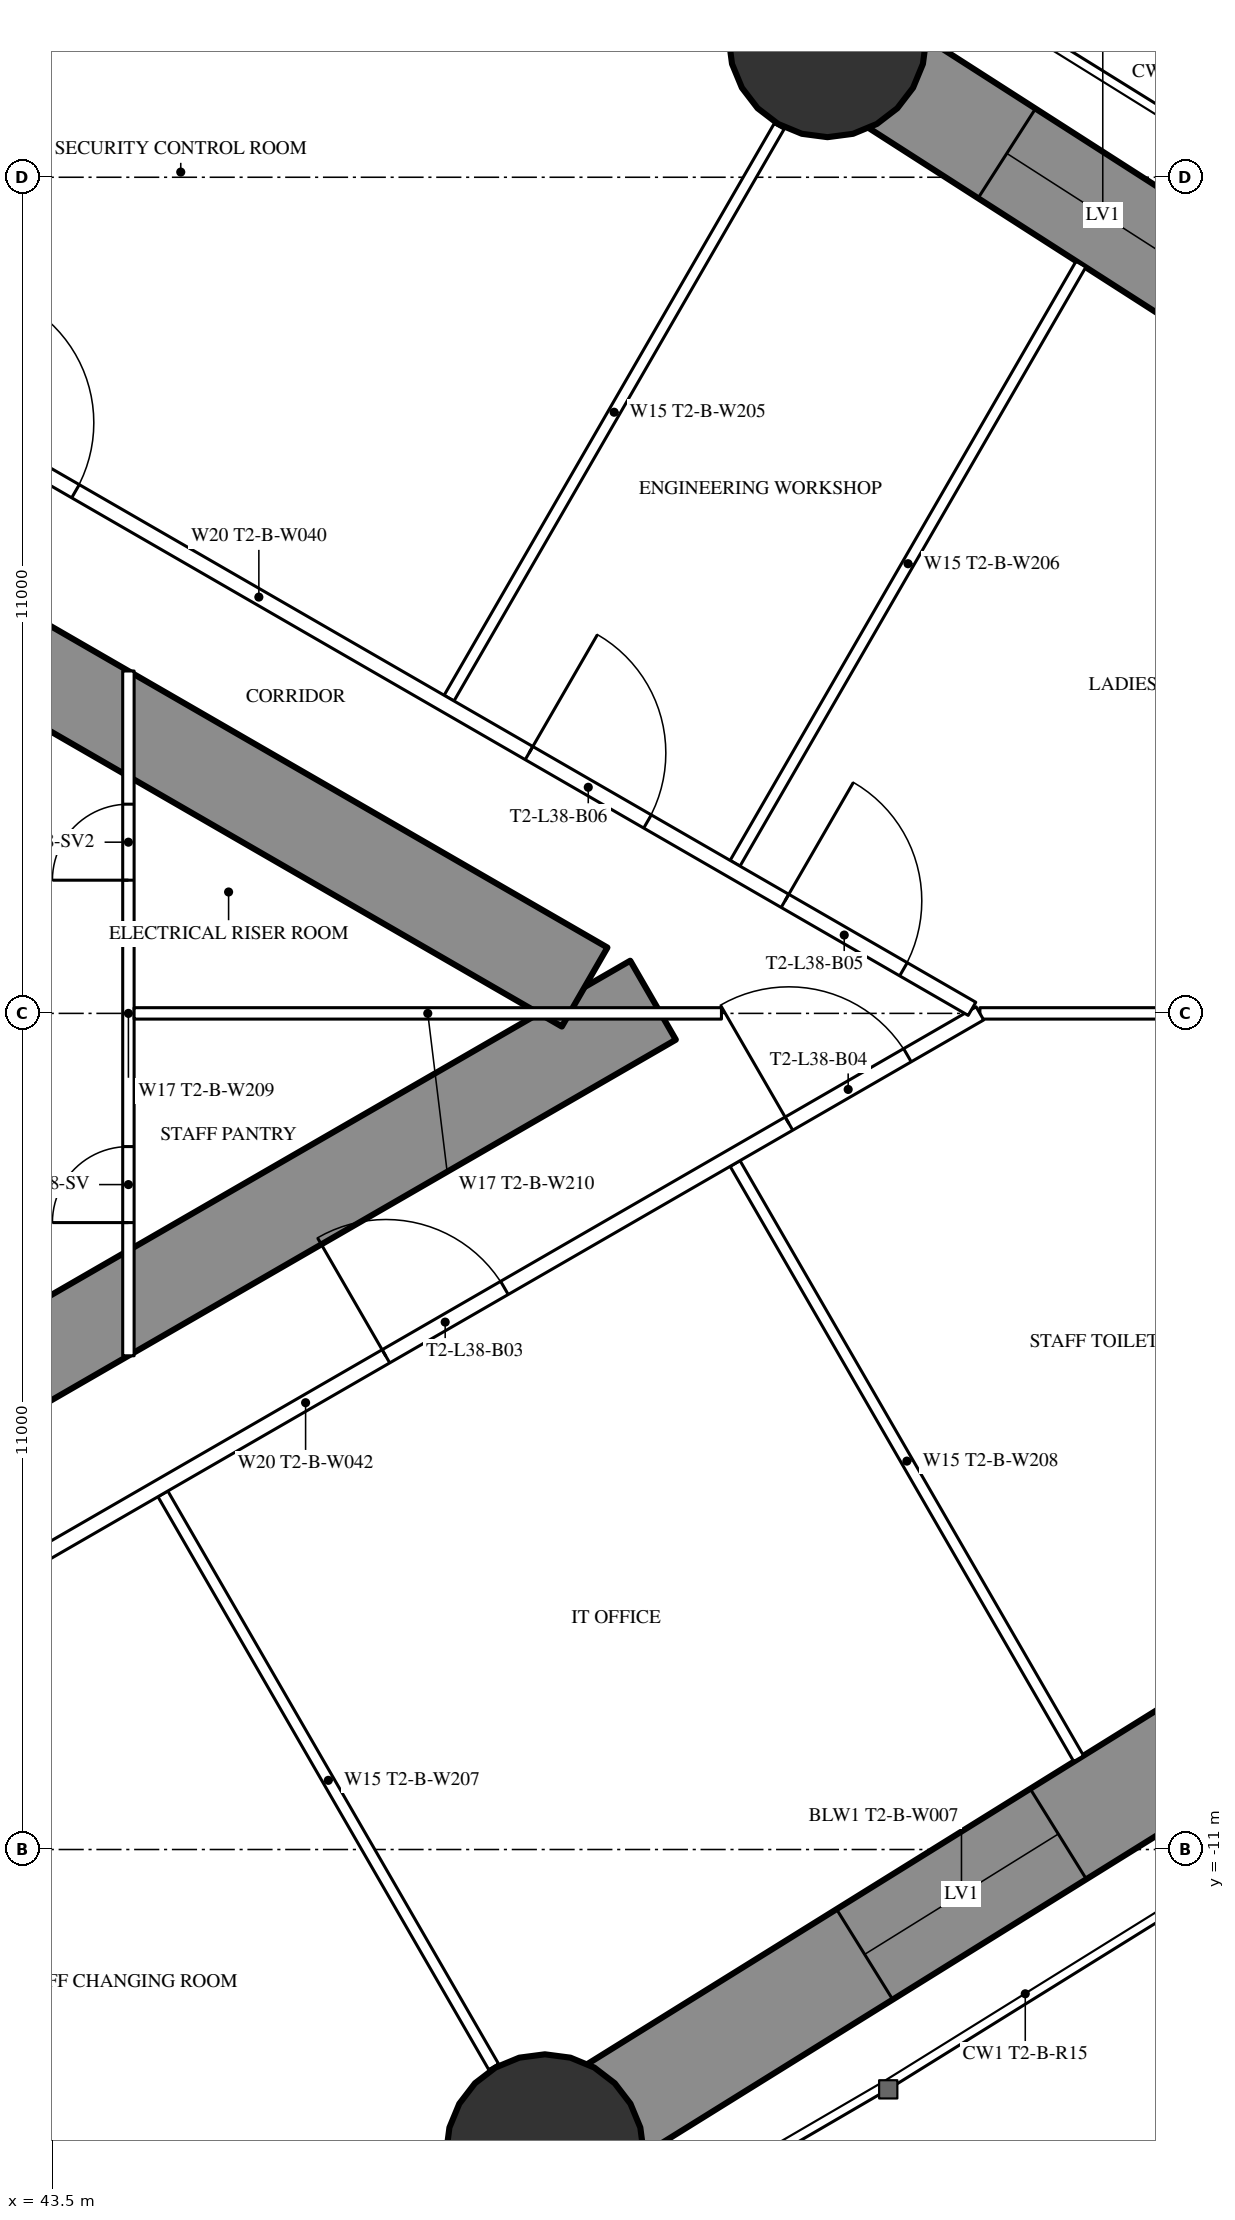
"""IFC4 building model, lengths in metres.
Left out: names, types, materials, properties, quantities, classifications, styles, units other than length and angle.
Written with IfcOpenShell. Run it as: python <this file> out.ifc"""

import sys

from ifc_helpers import new_model, si_unit, direction, frame, frame_2d, origin, origin_2d, place, context, subcontext, project, spatial, rectangle, hollow_circle, extrude, element, fill, save


model = new_model("IFC4")
c1 = context("Model", 3, precision=1e-05, world=origin(), true_north=direction((0.0, 1.0)))
c2 = subcontext(c1, "Body", "Model", "MODEL_VIEW")
j1 = project(units=[si_unit("LENGTHUNIT", "METRE"), si_unit("PLANEANGLEUNIT", "RADIAN")], contexts=[c1])
p1 = place(None, origin())
s1 = spatial("IfcSite", under=j1, at=p1, CompositionType="ELEMENT")
p2 = place(p1, origin())
s2 = spatial("IfcBuilding", under=s1, at=p2, CompositionType="ELEMENT")
p3 = place(p2, frame((0.0, 0.0, 143.1)))
s3 = spatial("IfcBuildingStorey", under=s2, at=p3, CompositionType="ELEMENT", Elevation=143.1)
for number, where, z_axis, x_axis in (
    (1, (53.697, 12.827, 0.0), (0.0, 0.0, 1.0), (1.0, 0.0, 0.0)),
    (2, (49.979, -14.994, 0.0), (0.0, 0.0, 1.0), (1.0, 0.0, 0.0)),
):
    element("IfcColumn", number, at=place(p3, frame(where, z_axis=z_axis, x_axis=x_axis)), inside=s3, PredefinedType="COLUMN", context=c2, shape_type="SweptSolid", body=[
        extrude(hollow_circle(Radius=1.3, WallThickness=0.1, at=origin_2d()), origin(), (0.0, 0.0, 1.0), 3.6),
    ])
p4 = place(p3, frame((27.2, -13.8, 0.0), z_axis=(0.0, 0.0, 1.0), x_axis=(0.866027159892, 0.499996958321, 0.0)))
e3 = element("IfcWall", 3, at=p4, inside=s3, PredefinedType="SHEAR", context=c2, shape_type="SweptSolid", body=[
    extrude(rectangle(XDim=27.947, YDim=1.2, at=frame_2d((13.973, 0.0))), origin(), (0.0, 0.0, 1.0), 3.6),
])
p5 = place(p4, frame((4.6, 0.0, 0.0)))
e4 = element("IfcOpeningElement", 4, at=p5, cuts=e3, PredefinedType="OPENING", context=c2, shape_type="SweptSolid", body=[
    extrude(rectangle(XDim=1.0, YDim=2.2, at=frame_2d((0.5, 1.1))), frame((0.0, 0.61, 0.0), z_axis=(0.0, -1.0, 0.0), x_axis=(1.0, 0.0, 0.0)), (0.0, 0.0, 1.0), 1.22),
])
p6 = place(p4, frame((14.045, 0.0, 0.0)))
e5 = element("IfcOpeningElement", 5, at=p6, cuts=e3, PredefinedType="OPENING", context=c2, shape_type="SweptSolid", body=[
    extrude(rectangle(XDim=1.8, YDim=2.2, at=frame_2d((0.9, 1.1))), frame((0.0, 0.61, 0.0), z_axis=(0.0, -1.0, 0.0), x_axis=(1.0, 0.0, 0.0)), (0.0, 0.0, 1.0), 1.22),
])
p7 = place(p3, frame((27.2, 13.8, 0.0), z_axis=(0.0, 0.0, 1.0), x_axis=(0.866024515034, -0.500001539357, 0.0)))
e6 = element("IfcWall", 6, at=p7, inside=s3, PredefinedType="SHEAR", context=c2, shape_type="SweptSolid", body=[
    extrude(rectangle(XDim=26.907, YDim=1.2, at=frame_2d((13.454, 0.0))), origin(), (0.0, 0.0, 1.0), 3.6),
])
p8 = place(p7, frame((4.5, 0.0, 0.0)))
e7 = element("IfcOpeningElement", 7, at=p8, cuts=e6, PredefinedType="OPENING", context=c2, shape_type="SweptSolid", body=[
    extrude(rectangle(XDim=1.0, YDim=2.2, at=frame_2d((0.5, 1.1))), frame((0.0, 0.61, 0.0), z_axis=(0.0, -1.0, 0.0), x_axis=(1.0, 0.0, 0.0)), (0.0, 0.0, 1.0), 1.22),
])
p9 = place(p7, frame((12.545, 0.0, 0.0)))
e8 = element("IfcOpeningElement", 8, at=p9, cuts=e6, PredefinedType="OPENING", context=c2, shape_type="SweptSolid", body=[
    extrude(rectangle(XDim=1.8, YDim=2.2, at=frame_2d((0.9, 1.1))), frame((0.0, 0.61, 0.0), z_axis=(0.0, -1.0, 0.0), x_axis=(1.0, 0.0, 0.0)), (0.0, 0.0, 1.0), 1.22),
])
p10 = place(p3, frame((42.366, -19.007, 0.0), z_axis=(0.0, 0.0, 1.0), x_axis=(0.884632510133, 0.466288882578, 0.0)))
e9 = element("IfcWall", 9, at=p10, inside=s3, PredefinedType="SHEAR", context=c2, shape_type="SweptSolid", body=[
    extrude(rectangle(XDim=8.606, YDim=1.4, at=frame_2d((4.303, 0.0))), origin(), (0.0, 0.0, 1.0), 3.6),
])
p11 = place(p10, frame((2.803, 0.0, 0.6)))
e10 = element("IfcOpeningElement", 10, at=p11, cuts=e9, PredefinedType="OPENING", context=c2, shape_type="SweptSolid", body=[
    extrude(rectangle(XDim=3.0, YDim=1.2, at=frame_2d((1.5, 0.6))), frame((0.0, 0.71, 0.0), z_axis=(0.0, -1.0, 0.0), x_axis=(1.0, 0.0, 0.0)), (0.0, 0.0, 1.0), 1.42),
])
p12 = place(p3, frame((49.979, -14.994, 0.0), z_axis=(0.0, 0.0, 1.0), x_axis=(0.849312372751, 0.527890607505, 0.0)))
e11 = element("IfcWall", 11, at=p12, inside=s3, PredefinedType="SHEAR", context=c2, shape_type="SweptSolid", body=[
    extrude(rectangle(XDim=12.906, YDim=1.4, at=frame_2d((6.453, 0.0))), origin(), (0.0, 0.0, 1.0), 3.6),
])
p13 = place(p12, frame((4.953, 0.0, 0.6)))
e12 = element("IfcOpeningElement", 12, at=p13, cuts=e11, PredefinedType="OPENING", context=c2, shape_type="SweptSolid", body=[
    extrude(rectangle(XDim=3.0, YDim=1.2, at=frame_2d((1.5, 0.6))), frame((0.0, 0.71, 0.0), z_axis=(0.0, -1.0, 0.0), x_axis=(1.0, 0.0, 0.0)), (0.0, 0.0, 1.0), 1.42),
])
p14 = place(p3, frame((60.941, 8.181, 0.0), z_axis=(0.0, 0.0, 1.0), x_axis=(-0.841727408736, 0.539902740669, 0.0)))
e13 = element("IfcWall", 13, at=p14, inside=s3, PredefinedType="SHEAR", context=c2, shape_type="SweptSolid", body=[
    extrude(rectangle(XDim=8.606, YDim=1.4, at=frame_2d((4.303, 0.0))), origin(), (0.0, 0.0, 1.0), 3.6),
])
p15 = place(p14, frame((2.803, 0.0, 0.6)))
e14 = element("IfcOpeningElement", 14, at=p15, cuts=e13, PredefinedType="OPENING", context=c2, shape_type="SweptSolid", body=[
    extrude(rectangle(XDim=3.0, YDim=1.2, at=frame_2d((1.5, 0.6))), frame((0.0, 0.71, 0.0), z_axis=(0.0, -1.0, 0.0), x_axis=(1.0, 0.0, 0.0)), (0.0, 0.0, 1.0), 1.42),
])
p16 = place(p3, frame((53.697, 12.827, 0.0), z_axis=(0.0, 0.0, 1.0), x_axis=(-0.87792015078, 0.478807068509, 0.0)))
e15 = element("IfcWall", 15, at=p16, inside=s3, PredefinedType="SHEAR", context=c2, shape_type="SweptSolid", body=[
    extrude(rectangle(XDim=12.906, YDim=1.4, at=frame_2d((6.453, 0.0))), origin(), (0.0, 0.0, 1.0), 3.6),
])
p17 = place(p16, frame((4.953, 0.0, 0.6)))
e16 = element("IfcOpeningElement", 16, at=p17, cuts=e15, PredefinedType="OPENING", context=c2, shape_type="SweptSolid", body=[
    extrude(rectangle(XDim=3.0, YDim=1.2, at=frame_2d((1.5, 0.6))), frame((0.0, 0.71, 0.0), z_axis=(0.0, -1.0, 0.0), x_axis=(1.0, 0.0, 0.0)), (0.0, 0.0, 1.0), 1.42),
])
p18 = place(p3, frame((44.954, -6.321, 0.0), z_axis=(0.0, 0.0, 1.0), x_axis=(0.500018676722, -0.866014620505, 0.0)))
e17 = element("IfcWall", 17, at=p18, inside=s3, PredefinedType="PARTITIONING", context=c2, shape_type="SweptSolid", body=[
    extrude(rectangle(XDim=8.704, YDim=0.15, at=frame_2d((4.352, 0.0))), origin(), (0.0, 0.0, 1.0), 2.15),
])
p19 = place(p3, frame((52.481, -1.975, 0.0), z_axis=(0.0, 0.0, 1.0), x_axis=(0.499984247144, -0.866034498509, 0.0)))
e18 = element("IfcWall", 18, at=p19, inside=s3, PredefinedType="PARTITIONING", context=c2, shape_type="SweptSolid", body=[
    extrude(rectangle(XDim=9.041, YDim=0.15, at=frame_2d((4.521, 0.0))), origin(), (0.0, 0.0, 1.0), 3.35),
])
p20 = place(p3, frame((48.719, 4.147, 0.0), z_axis=(0.0, 0.0, 1.0), x_axis=(0.499993328235, 0.866029255696, 0.0)))
e19 = element("IfcWall", 19, at=p20, inside=s3, PredefinedType="PARTITIONING", context=c2, shape_type="SweptSolid", body=[
    extrude(rectangle(XDim=8.686, YDim=0.15, at=frame_2d((4.343, 0.0))), origin(), (0.0, 0.0, 1.0), 2.15),
])
p21 = place(p3, frame((52.481, 1.975, 0.0), z_axis=(0.0, 0.0, 1.0), x_axis=(0.500008073096, 0.86602074273, 0.0)))
e20 = element("IfcWall", 20, at=p21, inside=s3, PredefinedType="PARTITIONING", context=c2, shape_type="SweptSolid", body=[
    extrude(rectangle(XDim=9.101, YDim=0.15, at=frame_2d((4.55, 0.0))), origin(), (0.0, 0.0, 1.0), 3.35),
])
p22 = place(p3, frame((55.702, 0.0, 0.0), z_axis=(0.0, 0.0, 1.0), x_axis=(1.0, 0.0, 0.0)))
e21 = element("IfcWall", 21, at=p22, inside=s3, PredefinedType="PARTITIONING", context=c2, shape_type="SweptSolid", body=[
    extrude(rectangle(XDim=11.575, YDim=0.15, at=frame_2d((5.788, 0.0))), origin(), (0.0, 0.0, 1.0), 2.15),
])
p23 = place(p3, frame((37.96, -10.243, 0.0), z_axis=(0.0, 0.0, 1.0), x_axis=(0.866026429433, 0.499998223521, 0.0)))
e22 = element("IfcWall", 22, at=p23, inside=s3, PredefinedType="PARTITIONING", context=c2, shape_type="SweptSolid", body=[
    extrude(rectangle(XDim=20.487, YDim=0.2, at=frame_2d((10.243, 0.0))), origin(), (0.0, 0.0, 1.0), 3.35),
])
p24 = place(p23, frame((11.464, 0.0, 0.0)))
e23 = element("IfcOpeningElement", 23, at=p24, cuts=e22, PredefinedType="OPENING", context=c2, shape_type="SweptSolid", body=[
    extrude(rectangle(XDim=1.8, YDim=2.2, at=frame_2d((0.9, 1.1))), frame((0.0, 0.11, 0.0), z_axis=(0.0, -1.0, 0.0), x_axis=(1.0, 0.0, 0.0)), (0.0, 0.0, 1.0), 0.22),
])
p25 = place(p23, frame((17.586, 0.0, 0.0)))
e24 = element("IfcOpeningElement", 24, at=p25, cuts=e22, PredefinedType="OPENING", context=c2, shape_type="SweptSolid", body=[
    extrude(rectangle(XDim=1.8, YDim=2.14, at=frame_2d((0.9, 1.07))), frame((0.0, 0.11, 0.0), z_axis=(0.0, -1.0, 0.0), x_axis=(1.0, 0.0, 0.0)), (0.0, 0.0, 1.0), 0.22),
])
p26 = place(p23, frame((3.221, 0.0, 0.0)))
e25 = element("IfcOpeningElement", 25, at=p26, cuts=e22, PredefinedType="OPENING", context=c2, shape_type="SweptSolid", body=[
    extrude(rectangle(XDim=1.8, YDim=2.2, at=frame_2d((0.9, 1.1))), frame((0.0, 0.11, 0.0), z_axis=(0.0, -1.0, 0.0), x_axis=(1.0, 0.0, 0.0)), (0.0, 0.0, 1.0), 0.22),
])
p27 = place(p3, frame((36.834, 10.894, 0.0), z_axis=(0.0, 0.0, 1.0), x_axis=(0.866028157229, -0.499995230863, 0.0)))
e26 = element("IfcWall", 26, at=p27, inside=s3, PredefinedType="PARTITIONING", context=c2, shape_type="SweptSolid", body=[
    extrude(rectangle(XDim=21.667, YDim=0.2, at=frame_2d((10.833, 0.0))), origin(), (0.0, 0.0, 1.0), 3.35),
])
p28 = place(p27, frame((18.826, 0.0, 0.0)))
e27 = element("IfcOpeningElement", 27, at=p28, cuts=e26, PredefinedType="OPENING", context=c2, shape_type="SweptSolid", body=[
    extrude(rectangle(XDim=1.8, YDim=2.2, at=frame_2d((0.9, 1.1))), frame((0.0, 0.11, 0.0), z_axis=(0.0, -1.0, 0.0), x_axis=(1.0, 0.0, 0.0)), (0.0, 0.0, 1.0), 0.22),
])
p29 = place(p27, frame((14.938, 0.0, 0.0)))
e28 = element("IfcOpeningElement", 28, at=p29, cuts=e26, PredefinedType="OPENING", context=c2, shape_type="SweptSolid", body=[
    extrude(rectangle(XDim=1.8, YDim=2.2, at=frame_2d((0.9, 1.1))), frame((0.0, 0.11, 0.0), z_axis=(0.0, -1.0, 0.0), x_axis=(1.0, 0.0, 0.0)), (0.0, 0.0, 1.0), 0.22),
])
p30 = place(p27, frame((6.248, 0.0, 0.0)))
e29 = element("IfcOpeningElement", 29, at=p30, cuts=e26, PredefinedType="OPENING", context=c2, shape_type="SweptSolid", body=[
    extrude(rectangle(XDim=1.8, YDim=2.2, at=frame_2d((0.9, 1.1))), frame((0.0, 0.11, 0.0), z_axis=(0.0, -1.0, 0.0), x_axis=(1.0, 0.0, 0.0)), (0.0, 0.0, 1.0), 0.22),
])
p31 = place(p3, frame((44.5, -4.505, 0.0), z_axis=(0.0, 0.0, 1.0), x_axis=(0.0, 1.0, 0.0)))
e30 = element("IfcWall", 30, at=p31, inside=s3, PredefinedType="PARTITIONING", context=c2, shape_type="SweptSolid", body=[
    extrude(rectangle(XDim=9.009, YDim=0.15, at=frame_2d((4.505, 0.0))), origin(), (0.0, 0.0, 1.0), 3.35),
])
p32 = place(p31, frame((1.752, 0.0, 0.0)))
e31 = element("IfcOpeningElement", 31, at=p32, cuts=e30, PredefinedType="OPENING", context=c2, shape_type="SweptSolid", body=[
    extrude(rectangle(XDim=1.0, YDim=2.2, at=frame_2d((0.5, 1.1))), frame((0.0, 0.085, 0.0), z_axis=(0.0, -1.0, 0.0), x_axis=(1.0, 0.0, 0.0)), (0.0, 0.0, 1.0), 0.17),
])
p33 = place(p31, frame((6.257, 0.0, 0.0)))
e32 = element("IfcOpeningElement", 32, at=p33, cuts=e30, PredefinedType="OPENING", context=c2, shape_type="SweptSolid", body=[
    extrude(rectangle(XDim=1.0, YDim=2.2, at=frame_2d((0.5, 1.1))), frame((0.0, 0.085, 0.0), z_axis=(0.0, -1.0, 0.0), x_axis=(1.0, 0.0, 0.0)), (0.0, 0.0, 1.0), 0.17),
])
p34 = place(p3, frame((44.575, 0.0, 0.0), z_axis=(0.0, 0.0, 1.0), x_axis=(1.0, 0.0, 0.0)))
e33 = element("IfcWall", 33, at=p34, inside=s3, PredefinedType="PARTITIONING", context=c2, shape_type="SweptSolid", body=[
    extrude(rectangle(XDim=7.727, YDim=0.15, at=frame_2d((3.864, 0.0))), origin(), (0.0, 0.0, 1.0), 2.15),
])
p35 = place(p13, origin())
e34 = element("IfcWindow", 34, at=p35, inside=s3, PartitioningType="SINGLE_PANEL", PredefinedType="WINDOW", context=c2, shape_type="SweptSolid", body=[
    extrude(rectangle(XDim=3.0, YDim=1.2, at=frame_2d((1.5, 0.6))), frame((0.0, 0.03, 0.0), z_axis=(0.0, -1.0, 0.0), x_axis=(1.0, 0.0, 0.0)), (0.0, 0.0, 1.0), 0.06),
])
fill(e12, e34)
p36 = place(p15, origin())
e35 = element("IfcWindow", 35, at=p36, inside=s3, PartitioningType="SINGLE_PANEL", PredefinedType="WINDOW", context=c2, shape_type="SweptSolid", body=[
    extrude(rectangle(XDim=3.0, YDim=1.2, at=frame_2d((1.5, 0.6))), frame((0.0, 0.03, 0.0), z_axis=(0.0, -1.0, 0.0), x_axis=(1.0, 0.0, 0.0)), (0.0, 0.0, 1.0), 0.06),
])
fill(e14, e35)
p37 = place(p24, origin())
e36 = element("IfcDoor", 36, at=p37, inside=s3, OperationType="DOUBLE_DOOR_SINGLE_SWING", PredefinedType="DOOR", context=c2, shape_type="SweptSolid", body=[
    extrude(rectangle(XDim=1.8, YDim=2.2, at=frame_2d((0.9, 1.1))), frame((0.0, 0.025, 0.0), z_axis=(0.0, -1.0, 0.0), x_axis=(1.0, 0.0, 0.0)), (0.0, 0.0, 1.0), 0.05),
])
fill(e23, e36)
p38 = place(p25, origin())
e37 = element("IfcDoor", 37, at=p38, inside=s3, OperationType="DOUBLE_DOOR_SINGLE_SWING", PredefinedType="DOOR", context=c2, shape_type="SweptSolid", body=[
    extrude(rectangle(XDim=1.8, YDim=2.14, at=frame_2d((0.9, 1.07))), frame((0.0, 0.025, 0.0), z_axis=(0.0, -1.0, 0.0), x_axis=(1.0, 0.0, 0.0)), (0.0, 0.0, 1.0), 0.05),
])
fill(e24, e37)
p39 = place(p28, origin())
e38 = element("IfcDoor", 38, at=p39, inside=s3, OperationType="DOUBLE_DOOR_SINGLE_SWING", PredefinedType="DOOR", context=c2, shape_type="SweptSolid", body=[
    extrude(rectangle(XDim=1.8, YDim=2.2, at=frame_2d((0.9, 1.1))), frame((0.0, 0.025, 0.0), z_axis=(0.0, -1.0, 0.0), x_axis=(1.0, 0.0, 0.0)), (0.0, 0.0, 1.0), 0.05),
])
fill(e27, e38)
p40 = place(p29, origin())
e39 = element("IfcDoor", 39, at=p40, inside=s3, OperationType="DOUBLE_DOOR_SINGLE_SWING", PredefinedType="DOOR", context=c2, shape_type="SweptSolid", body=[
    extrude(rectangle(XDim=1.8, YDim=2.2, at=frame_2d((0.9, 1.1))), frame((0.0, 0.025, 0.0), z_axis=(0.0, -1.0, 0.0), x_axis=(1.0, 0.0, 0.0)), (0.0, 0.0, 1.0), 0.05),
])
fill(e28, e39)
p41 = place(p30, origin())
e40 = element("IfcDoor", 40, at=p41, inside=s3, OperationType="DOUBLE_DOOR_SINGLE_SWING", PredefinedType="DOOR", context=c2, shape_type="SweptSolid", body=[
    extrude(rectangle(XDim=1.8, YDim=2.2, at=frame_2d((0.9, 1.1))), frame((0.0, 0.025, 0.0), z_axis=(0.0, -1.0, 0.0), x_axis=(1.0, 0.0, 0.0)), (0.0, 0.0, 1.0), 0.05),
])
fill(e29, e40)
p42 = place(p32, origin())
e41 = element("IfcDoor", 41, at=p42, inside=s3, OperationType="SINGLE_SWING_LEFT", PredefinedType="DOOR", context=c2, shape_type="SweptSolid", body=[
    extrude(rectangle(XDim=1.0, YDim=2.2, at=frame_2d((0.5, 1.1))), frame((0.0, 0.025, 0.0), z_axis=(0.0, -1.0, 0.0), x_axis=(1.0, 0.0, 0.0)), (0.0, 0.0, 1.0), 0.05),
])
fill(e31, e41)
p43 = place(p33, origin())
e42 = element("IfcDoor", 42, at=p43, inside=s3, OperationType="SINGLE_SWING_LEFT", PredefinedType="DOOR", context=c2, shape_type="SweptSolid", body=[
    extrude(rectangle(XDim=1.0, YDim=2.2, at=frame_2d((0.5, 1.1))), frame((0.0, 0.025, 0.0), z_axis=(0.0, -1.0, 0.0), x_axis=(1.0, 0.0, 0.0)), (0.0, 0.0, 1.0), 0.05),
])
fill(e32, e42)
save(model, sys.argv[1])
